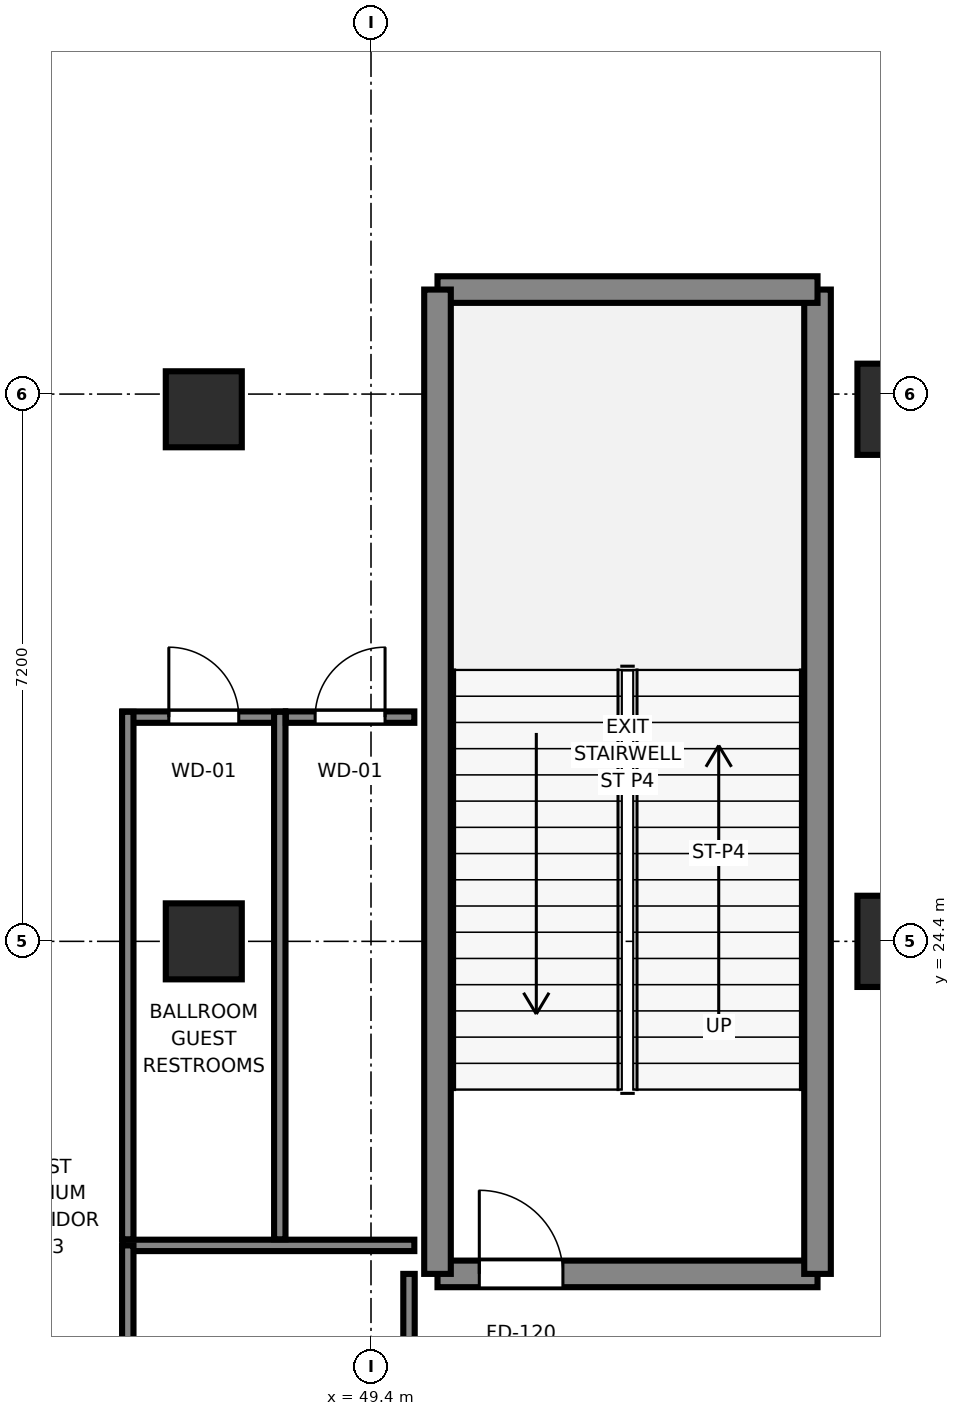
"""IFC4 building model, lengths in metres.
Left out: names, types, materials, properties, quantities, classifications, styles, units other than length and angle.
Written with IfcOpenShell. Run it as: python <this file> out.ifc"""

import sys

from ifc_helpers import new_model, si_unit, direction, frame, frame_2d, origin, origin_2d, place, context, subcontext, project, spatial, rectangle, extrude, source, transform, mapped, element, fill, save


model = new_model("IFC4")
c1 = context("Model", 3, precision=1e-05, world=origin(), true_north=direction((0.0, 1.0)))
c2 = subcontext(c1, "Body", "Model", "MODEL_VIEW")
j1 = project(units=[si_unit("LENGTHUNIT", "METRE"), si_unit("PLANEANGLEUNIT", "RADIAN")], contexts=[c1])
p1 = place(None, origin())
s1 = spatial("IfcSite", under=j1, at=p1, CompositionType="ELEMENT")
p2 = place(p1, origin())
s2 = spatial("IfcBuilding", under=s1, at=p2, CompositionType="ELEMENT")
p3 = place(p2, frame((0.0, 0.0, 16.0)))
s3 = spatial("IfcBuildingStorey", under=s2, at=p3, CompositionType="ELEMENT", Elevation=16.0)
p4 = place(p3, frame((50.275, 20.025, 0.0), z_axis=(0.0, 0.0, 1.0), x_axis=(1.0, 0.0, 0.0)))
e1 = element("IfcWall", 1, at=p4, inside=s3, PredefinedType="SHEAR", context=c2, shape_type="SweptSolid", body=[
    extrude(rectangle(XDim=5.0, YDim=0.35, at=frame_2d((2.5, 0.0))), origin(), (0.0, 0.0, 1.0), 6.4),
])
p5 = place(p4, frame((0.55, 0.0, 0.0)))
e2 = element("IfcOpeningElement", 2, at=p5, cuts=e1, PredefinedType="OPENING", context=c2, shape_type="SweptSolid", body=[
    extrude(rectangle(XDim=1.1, YDim=2.12, at=frame_2d((0.55, 1.06))), frame((0.0, 0.185, 0.0), z_axis=(0.0, -1.0, 0.0), x_axis=(1.0, 0.0, 0.0)), (0.0, 0.0, 1.0), 0.37),
])
p6 = place(p3, frame((55.275, 20.025, 0.0), z_axis=(0.0, 0.0, 1.0), x_axis=(0.0, 1.0, 0.0)))
e3 = element("IfcWall", 3, at=p6, inside=s3, PredefinedType="SHEAR", context=c2, shape_type="SweptSolid", body=[
    extrude(rectangle(XDim=12.95, YDim=0.35, at=frame_2d((6.475, 0.0))), origin(), (0.0, 0.0, 1.0), 6.4),
])
p7 = place(p3, frame((55.275, 32.975, 0.0), z_axis=(0.0, 0.0, 1.0), x_axis=(-1.0, 0.0, 0.0)))
e4 = element("IfcWall", 4, at=p7, inside=s3, PredefinedType="SHEAR", context=c2, shape_type="SweptSolid", body=[
    extrude(rectangle(XDim=5.0, YDim=0.35, at=frame_2d((2.5, 0.0))), origin(), (0.0, 0.0, 1.0), 6.4),
])
p8 = place(p3, frame((50.275, 32.975, 0.0), z_axis=(0.0, 0.0, 1.0), x_axis=(0.0, -1.0, 0.0)))
e5 = element("IfcWall", 5, at=p8, inside=s3, PredefinedType="SHEAR", context=c2, shape_type="SweptSolid", body=[
    extrude(rectangle(XDim=12.95, YDim=0.35, at=frame_2d((6.475, 0.0))), origin(), (0.0, 0.0, 1.0), 6.4),
])
m1 = source(origin(), c2, "Body", "SweptSolid", [
    extrude(rectangle(XDim=1.0, YDim=1.0, at=origin_2d()), origin(), (0.0, 0.0, 1.0), 6.4),
])
p9 = place(p3, frame((47.2, 24.4, 0.0), z_axis=(0.0, 0.0, 1.0), x_axis=(1.0, 0.0, 0.0)))
e6 = element("IfcColumn", 6, at=p9, inside=s3, PredefinedType="COLUMN", context=c2, shape_type="MappedRepresentation", body=[
    mapped(m1, transform((0.0, 0.0, 0.0), x_axis=(1.0, 0.0, 0.0), y_axis=(0.0, 1.0, 0.0), z_axis=(0.0, 0.0, 1.0), scale=1.0)),
])
m2 = source(origin(), c2, "Body", "SweptSolid", [
    extrude(rectangle(XDim=1.2, YDim=1.2, at=origin_2d()), origin(), (0.0, 0.0, 1.0), 6.4),
])
p10 = place(p3, frame((56.4, 24.4, 0.0), z_axis=(0.0, 0.0, 1.0), x_axis=(1.0, 0.0, 0.0)))
e7 = element("IfcColumn", 7, at=p10, inside=s3, PredefinedType="COLUMN", context=c2, shape_type="MappedRepresentation", body=[
    mapped(m2, transform((0.0, 0.0, 0.0), x_axis=(1.0, 0.0, 0.0), y_axis=(0.0, 1.0, 0.0), z_axis=(0.0, 0.0, 1.0), scale=1.0)),
])
p11 = place(p3, frame((47.2, 31.4, 0.0), z_axis=(0.0, 0.0, 1.0), x_axis=(1.0, 0.0, 0.0)))
e8 = element("IfcColumn", 8, at=p11, inside=s3, PredefinedType="COLUMN", context=c2, shape_type="MappedRepresentation", body=[
    mapped(m1, transform((0.0, 0.0, 0.0), x_axis=(1.0, 0.0, 0.0), y_axis=(0.0, 1.0, 0.0), z_axis=(0.0, 0.0, 1.0), scale=1.0)),
])
p12 = place(p3, frame((56.4, 31.4, 0.0), z_axis=(0.0, 0.0, 1.0), x_axis=(1.0, 0.0, 0.0)))
e9 = element("IfcColumn", 9, at=p12, inside=s3, PredefinedType="COLUMN", context=c2, shape_type="MappedRepresentation", body=[
    mapped(m2, transform((0.0, 0.0, 0.0), x_axis=(1.0, 0.0, 0.0), y_axis=(0.0, 1.0, 0.0), z_axis=(0.0, 0.0, 1.0), scale=1.0)),
])
p13 = place(p3, frame((46.13, 20.4, 0.0), z_axis=(0.0, 0.0, 1.0), x_axis=(1.0, 0.0, 0.0)))
e10 = element("IfcWall", 10, at=p13, inside=s3, PredefinedType="PARTITIONING", context=c2, shape_type="SweptSolid", body=[
    extrude(rectangle(XDim=3.84, YDim=0.15, at=frame_2d((1.92, 0.0))), origin(), (0.0, 0.0, 1.0), 6.14),
])
p14 = place(p3, frame((46.2, 8.0, 0.0), z_axis=(0.0, 0.0, 1.0), x_axis=(0.0, 1.0, 0.0)))
e11 = element("IfcWall", 11, at=p14, inside=s3, PredefinedType="PARTITIONING", context=c2, shape_type="SweptSolid", body=[
    extrude(rectangle(XDim=12.4, YDim=0.15, at=frame_2d((6.2, 0.0))), origin(), (0.0, 0.0, 1.0), 6.14),
])
p15 = place(p14, frame((5.39, 0.0, 0.0)))
e12 = element("IfcOpeningElement", 12, at=p15, cuts=e11, PredefinedType="OPENING", context=c2, shape_type="SweptSolid", body=[
    extrude(rectangle(XDim=1.02, YDim=2.03, at=frame_2d((0.51, 1.015))), frame((0.0, 0.085, 0.0), z_axis=(0.0, -1.0, 0.0), x_axis=(1.0, 0.0, 0.0)), (0.0, 0.0, 1.0), 0.17),
])
p16 = place(p3, frame((49.9, 14.575, 0.0), z_axis=(0.0, 0.0, 1.0), x_axis=(0.0, 1.0, 0.0)))
e13 = element("IfcWall", 13, at=p16, inside=s3, PredefinedType="PARTITIONING", context=c2, shape_type="SweptSolid", body=[
    extrude(rectangle(XDim=5.45, YDim=0.15, at=frame_2d((2.725, 0.0))), origin(), (0.0, 0.0, 1.0), 6.14),
])
p17 = place(p3, frame((46.13, 27.35, 0.0), z_axis=(0.0, 0.0, 1.0), x_axis=(1.0, 0.0, 0.0)))
e14 = element("IfcWall", 14, at=p17, inside=s3, PredefinedType="PARTITIONING", context=c2, shape_type="SweptSolid", body=[
    extrude(rectangle(XDim=2.14, YDim=0.15, at=frame_2d((1.07, 0.0))), origin(), (0.0, 0.0, 1.0), 6.14),
])
p18 = place(p17, frame((0.61, 0.0, 0.0)))
e15 = element("IfcOpeningElement", 15, at=p18, cuts=e14, PredefinedType="OPENING", context=c2, shape_type="SweptSolid", body=[
    extrude(rectangle(XDim=0.92, YDim=2.01, at=frame_2d((0.46, 1.005))), frame((0.0, 0.085, 0.0), z_axis=(0.0, -1.0, 0.0), x_axis=(1.0, 0.0, 0.0)), (0.0, 0.0, 1.0), 0.17),
])
for number, where, z_axis, x_axis in (
    (16, (46.2, 20.48, 0.0), (0.0, 0.0, 1.0), (0.0, 1.0, 0.0)),
    (17, (48.2, 20.48, 0.0), (0.0, 0.0, 1.0), (0.0, 1.0, 0.0)),
):
    element("IfcWall", number, at=place(p3, frame(where, z_axis=z_axis, x_axis=x_axis)), inside=s3, PredefinedType="PARTITIONING", context=c2, shape_type="SweptSolid", body=[
        extrude(rectangle(XDim=6.94, YDim=0.15, at=frame_2d((3.47, 0.0))), origin(), (0.0, 0.0, 1.0), 6.14),
    ])
p19 = place(p3, frame((48.28, 27.35, 0.0), z_axis=(0.0, 0.0, 1.0), x_axis=(1.0, 0.0, 0.0)))
e18 = element("IfcWall", 18, at=p19, inside=s3, PredefinedType="PARTITIONING", context=c2, shape_type="SweptSolid", body=[
    extrude(rectangle(XDim=1.69, YDim=0.15, at=frame_2d((0.845, 0.0))), origin(), (0.0, 0.0, 1.0), 6.14),
])
p20 = place(p19, frame((0.385, 0.0, 0.0)))
e19 = element("IfcOpeningElement", 19, at=p20, cuts=e18, PredefinedType="OPENING", context=c2, shape_type="SweptSolid", body=[
    extrude(rectangle(XDim=0.92, YDim=2.01, at=frame_2d((0.46, 1.005))), frame((0.0, 0.085, 0.0), z_axis=(0.0, -1.0, 0.0), x_axis=(1.0, 0.0, 0.0)), (0.0, 0.0, 1.0), 0.17),
])
m3 = source(origin(), c2, "Body", "SweptSolid", [
    extrude(rectangle(XDim=1.1, YDim=2.12, at=frame_2d((0.55, 1.06))), frame((0.0, 0.025, 0.0), z_axis=(0.0, -1.0, 0.0), x_axis=(1.0, 0.0, 0.0)), (0.0, 0.0, 1.0), 0.05),
])
p21 = place(p5, origin())
e20 = element("IfcDoor", 20, at=p21, inside=s3, OperationType="SINGLE_SWING_LEFT", PredefinedType="DOOR", context=c2, shape_type="MappedRepresentation", body=[
    mapped(m3, transform((0.0, 0.0, 0.0), x_axis=(1.0, 0.0, 0.0), y_axis=(0.0, 1.0, 0.0), z_axis=(0.0, 0.0, 1.0), scale=1.0)),
])
fill(e2, e20)
m4 = source(origin(), c2, "Body", "SweptSolid", [
    extrude(rectangle(XDim=0.92, YDim=2.01, at=frame_2d((0.46, 1.005))), frame((0.0, 0.025, 0.0), z_axis=(0.0, -1.0, 0.0), x_axis=(1.0, 0.0, 0.0)), (0.0, 0.0, 1.0), 0.05),
])
p22 = place(p18, origin())
e21 = element("IfcDoor", 21, at=p22, inside=s3, OperationType="SINGLE_SWING_LEFT", PredefinedType="DOOR", context=c2, shape_type="MappedRepresentation", body=[
    mapped(m4, transform((0.0, 0.0, 0.0), x_axis=(1.0, 0.0, 0.0), y_axis=(0.0, 1.0, 0.0), z_axis=(0.0, 0.0, 1.0), scale=1.0)),
])
fill(e15, e21)
p23 = place(p20, origin())
e22 = element("IfcDoor", 22, at=p23, inside=s3, OperationType="SINGLE_SWING_RIGHT", PredefinedType="DOOR", context=c2, shape_type="MappedRepresentation", body=[
    mapped(m4, transform((0.0, 0.0, 0.0), x_axis=(1.0, 0.0, 0.0), y_axis=(0.0, 1.0, 0.0), z_axis=(0.0, 0.0, 1.0), scale=1.0)),
])
fill(e19, e22)
save(model, sys.argv[1])
